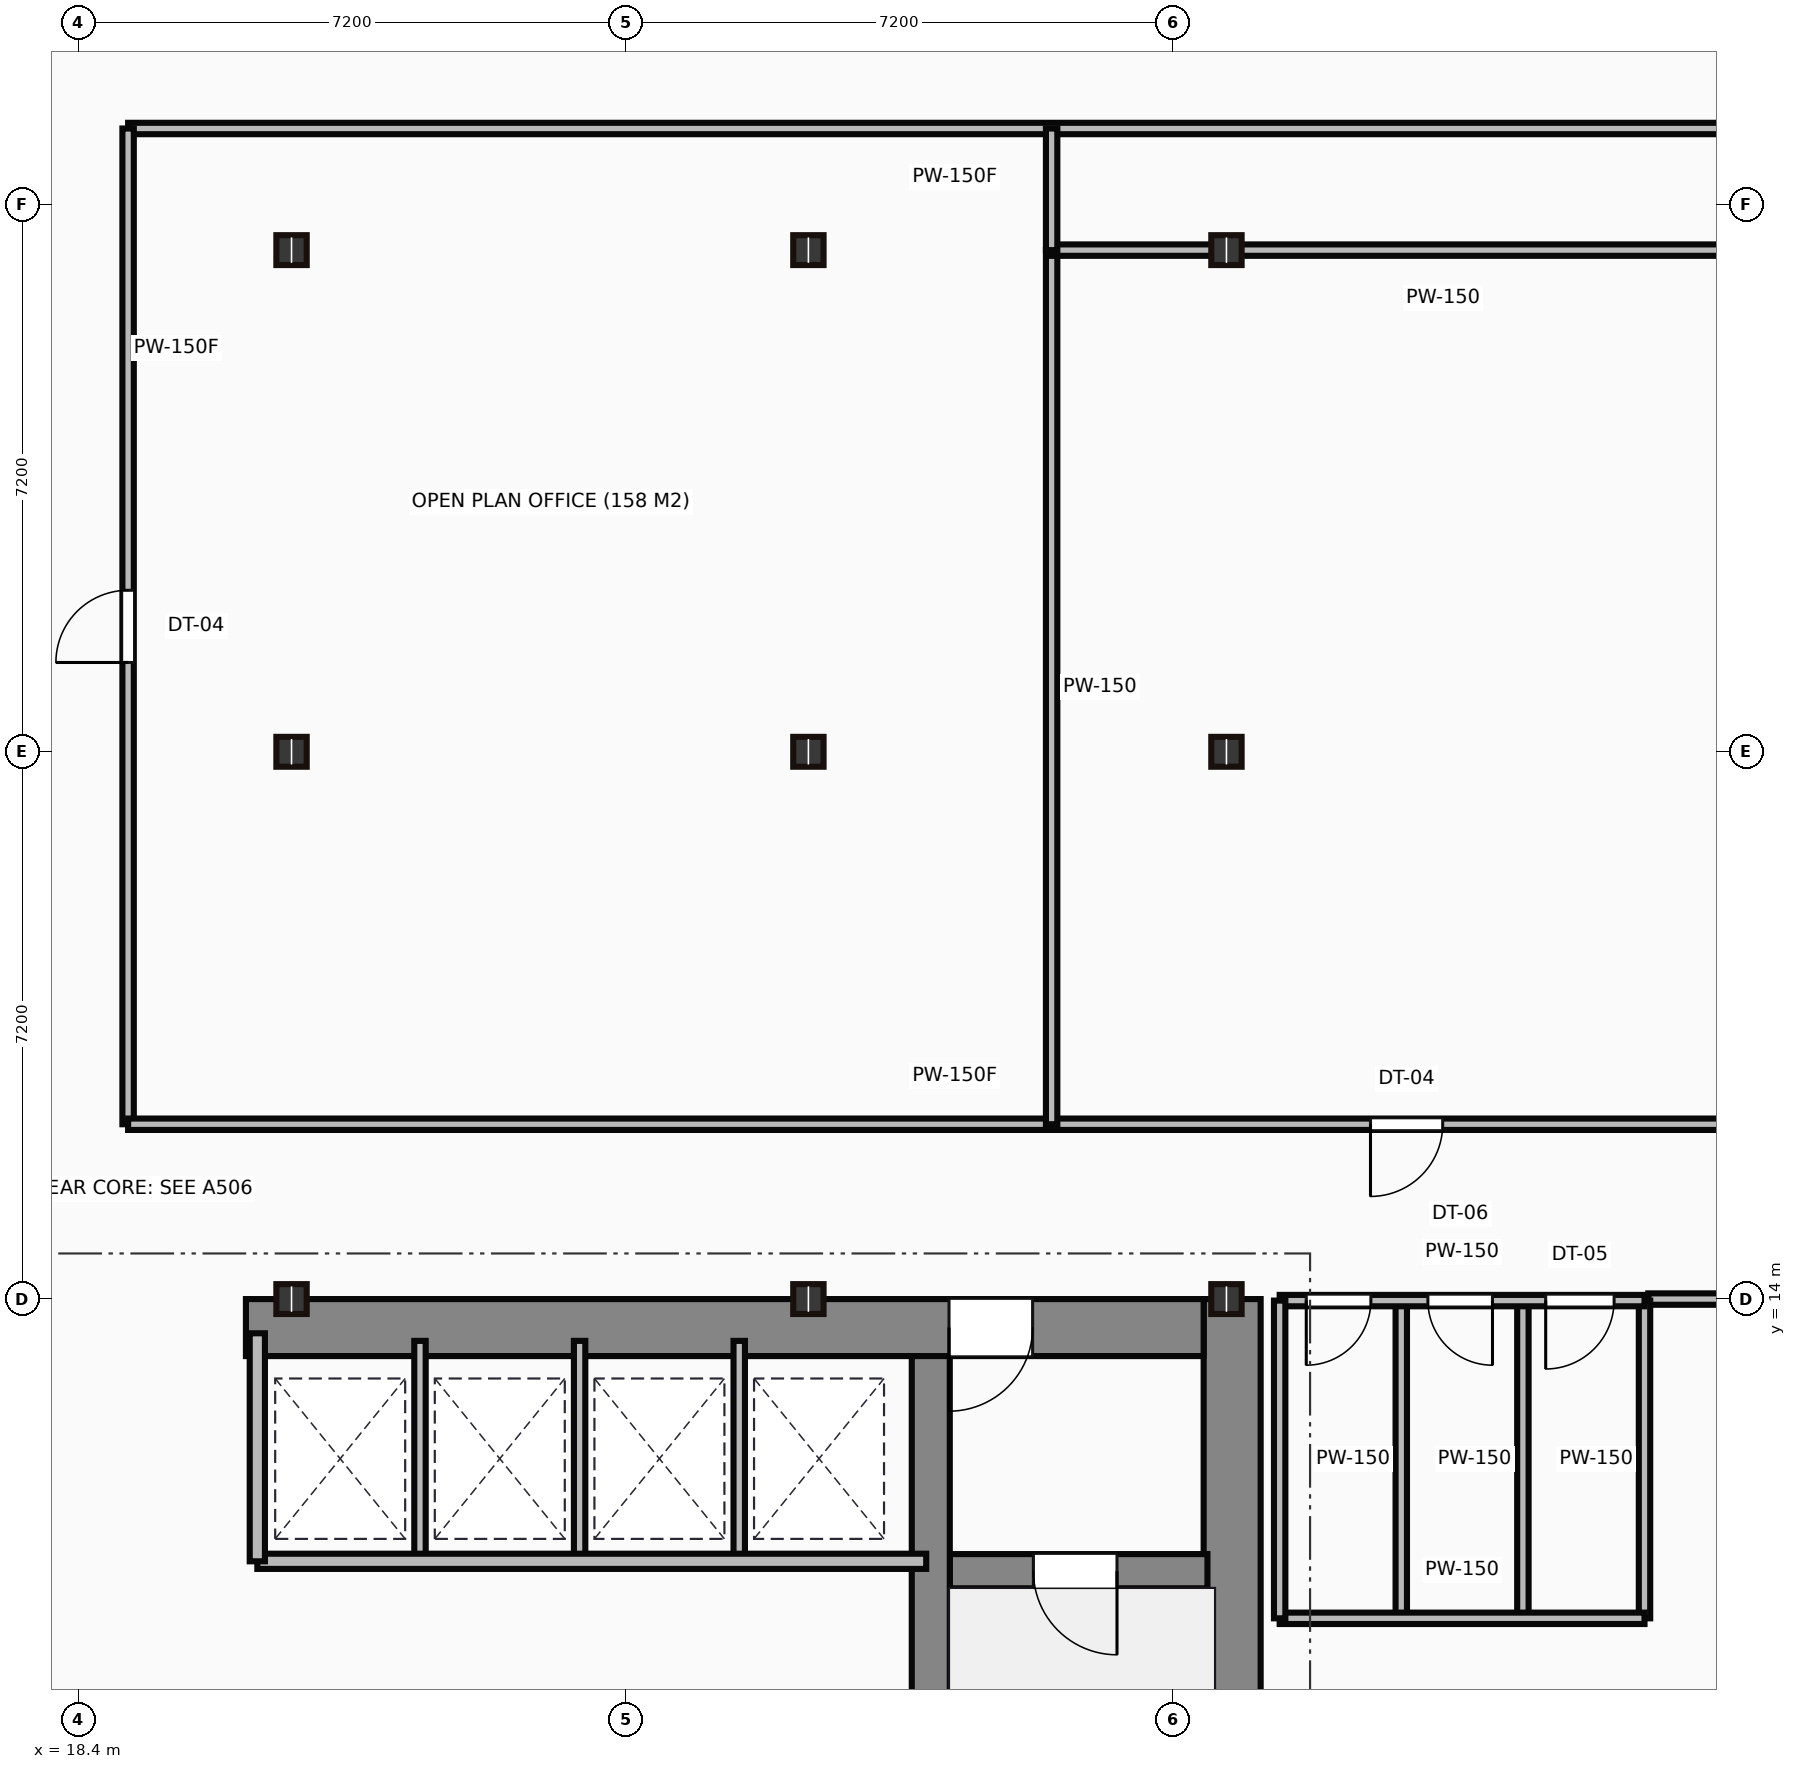
"""IFC4 building model, lengths in metres.
Left out: names, types, materials, properties, quantities, classifications, styles, units other than length and angle.
Written with IfcOpenShell. Run it as: python <this file> out.ifc"""

import sys

from ifc_helpers import new_model, si_unit, direction, frame, frame_2d, origin, origin_2d, place, context, subcontext, project, spatial, rectangle, i_section, extrude, source, transform, mapped, element, fill, save


model = new_model("IFC4")
c1 = context("Model", 3, precision=1e-05, world=origin(), true_north=direction((0.0, 1.0)))
c2 = subcontext(c1, "Body", "Model", "MODEL_VIEW")
j1 = project(units=[si_unit("LENGTHUNIT", "METRE"), si_unit("PLANEANGLEUNIT", "RADIAN")], contexts=[c1])
p1 = place(None, origin())
s1 = spatial("IfcSite", under=j1, at=p1, CompositionType="ELEMENT")
p2 = place(p1, origin())
s2 = spatial("IfcBuilding", under=s1, at=p2, CompositionType="ELEMENT")
p3 = place(p2, frame((0.0, 0.0, 128.8)))
s3 = spatial("IfcBuildingStorey", under=s2, at=p3, CompositionType="ELEMENT", Elevation=128.8)
m1 = source(origin(), c2, "Body", "SweptSolid", [
    extrude(rectangle(XDim=13.1, YDim=0.75, at=frame_2d((6.55, 0.0))), origin(), (0.0, 0.0, 1.0), 3.65),
])
p4 = place(p3, frame((33.575, 0.9, 0.0), z_axis=(0.0, 0.0, 1.0), x_axis=(0.0, 1.0, 0.0)))
e1 = element("IfcWall", 1, at=p4, inside=s3, PredefinedType="SHEAR", context=c2, shape_type="MappedRepresentation", body=[
    mapped(m1, transform((0.0, 0.0, 0.0))),
])
m2 = source(origin(), c2, "Body", "SweptSolid", [
    extrude(rectangle(XDim=12.6, YDim=0.75, at=frame_2d((6.3, 0.0))), origin(), (0.0, 0.0, 1.0), 3.65),
])
p5 = place(p3, frame((20.6, 13.625, 0.0), z_axis=(0.0, 0.0, 1.0), x_axis=(1.0, 0.0, 0.0)))
e2 = element("IfcWall", 2, at=p5, inside=s3, PredefinedType="SHEAR", context=c2, shape_type="MappedRepresentation", body=[
    mapped(m2, transform((0.0, 0.0, 0.0))),
])
p6 = place(p5, frame((9.25, 0.0, 0.0)))
e3 = element("IfcOpeningElement", 3, at=p6, cuts=e2, PredefinedType="OPENING", context=c2, shape_type="SweptSolid", body=[
    extrude(rectangle(XDim=1.1, YDim=2.15, at=frame_2d((0.55, 1.075))), frame((0.0, 0.385, 0.0), z_axis=(0.0, -1.0, 0.0), x_axis=(1.0, 0.0, 0.0)), (0.0, 0.0, 1.0), 0.77),
])
m3 = source(origin(), c2, "Body", "SweptSolid", [
    extrude(rectangle(XDim=12.35, YDim=0.5, at=frame_2d((6.175, 0.0))), origin(), (0.0, 0.0, 1.0), 3.65),
])
p7 = place(p3, frame((29.61, 0.9, 0.0), z_axis=(0.0, 0.0, 1.0), x_axis=(0.0, 1.0, 0.0)))
e4 = element("IfcWall", 4, at=p7, inside=s3, PredefinedType="SHEAR", context=c2, shape_type="MappedRepresentation", body=[
    mapped(m3, transform((0.0, 0.0, 0.0))),
])
m4 = source(origin(), c2, "Body", "SweptSolid", [
    extrude(rectangle(XDim=3.39, YDim=0.45, at=frame_2d((1.695, 0.0))), origin(), (0.0, 0.0, 1.0), 3.65),
])
p8 = place(p3, frame((29.86, 10.42, 0.0), z_axis=(0.0, 0.0, 1.0), x_axis=(1.0, 0.0, 0.0)))
e5 = element("IfcWall", 5, at=p8, inside=s3, PredefinedType="SHEAR", context=c2, shape_type="MappedRepresentation", body=[
    mapped(m4, transform((0.0, 0.0, 0.0))),
])
p9 = place(p8, frame((1.1, 0.0, 0.0)))
e6 = element("IfcOpeningElement", 6, at=p9, cuts=e5, PredefinedType="OPENING", context=c2, shape_type="SweptSolid", body=[
    extrude(rectangle(XDim=1.1, YDim=2.15, at=frame_2d((0.55, 1.075))), frame((0.0, 0.235, 0.0), z_axis=(0.0, -1.0, 0.0), x_axis=(1.0, 0.0, 0.0)), (0.0, 0.0, 1.0), 0.47),
])
m5 = source(origin(), c2, "Body", "SweptSolid", [
    extrude(i_section(OverallWidth=0.399, OverallDepth=0.393, WebThickness=0.023, FlangeThickness=0.037, at=origin_2d()), origin(), (0.0, 0.0, 1.0), 3.65),
])
for number, where, z_axis, x_axis in (
    (7, (21.2, 14.0, 0.0), (0.0, 0.0, 1.0), (1.0, 0.0, 0.0)),
    (8, (21.2, 21.2, 0.0), (0.0, 0.0, 1.0), (1.0, 0.0, 0.0)),
    (9, (21.2, 27.8, 0.0), (0.0, 0.0, 1.0), (1.0, 0.0, 0.0)),
    (10, (28.0, 14.0, 0.0), (0.0, 0.0, 1.0), (1.0, 0.0, 0.0)),
    (11, (28.0, 21.2, 0.0), (0.0, 0.0, 1.0), (1.0, 0.0, 0.0)),
    (12, (28.0, 27.8, 0.0), (0.0, 0.0, 1.0), (1.0, 0.0, 0.0)),
    (13, (33.5, 14.0, 0.0), (0.0, 0.0, 1.0), (1.0, 0.0, 0.0)),
    (14, (33.5, 21.2, 0.0), (0.0, 0.0, 1.0), (1.0, 0.0, 0.0)),
    (15, (33.5, 27.8, 0.0), (0.0, 0.0, 1.0), (1.0, 0.0, 0.0)),
):
    element("IfcColumn", number, at=place(p3, frame(where, z_axis=z_axis, x_axis=x_axis)), inside=s3, PredefinedType="COLUMN", context=c2, shape_type="MappedRepresentation", body=[
        mapped(m5, transform((0.0, 0.0, 0.0))),
    ])
m6 = source(origin(), c2, "Body", "SweptSolid", [
    extrude(rectangle(XDim=8.8, YDim=0.2, at=frame_2d((4.4, 0.0))), origin(), (0.0, 0.0, 1.0), 3.4),
])
p10 = place(p3, frame((20.75, 10.55, 0.0), z_axis=(0.0, 0.0, 1.0), x_axis=(1.0, 0.0, 0.0)))
e16 = element("IfcWall", 16, at=p10, inside=s3, PredefinedType="PARTITIONING", context=c2, shape_type="MappedRepresentation", body=[
    mapped(m6, transform((0.0, 0.0, 0.0))),
])
m7 = source(origin(), c2, "Body", "SweptSolid", [
    extrude(rectangle(XDim=3.0, YDim=0.2, at=frame_2d((1.5, 0.0))), origin(), (0.0, 0.0, 1.0), 3.4),
])
p11 = place(p3, frame((20.75, 10.55, 0.0), z_axis=(0.0, 0.0, 1.0), x_axis=(0.0, 1.0, 0.0)))
e17 = element("IfcWall", 17, at=p11, inside=s3, PredefinedType="PARTITIONING", context=c2, shape_type="MappedRepresentation", body=[
    mapped(m7, transform((0.0, 0.0, 0.0))),
])
m8 = source(origin(), c2, "Body", "SweptSolid", [
    extrude(rectangle(XDim=2.85, YDim=0.15, at=frame_2d((1.425, 0.0))), origin(), (0.0, 0.0, 1.0), 3.4),
])
for number, where, z_axis, x_axis in (
    (18, (22.89, 10.6, 0.0), (0.0, 0.0, 1.0), (0.0, 1.0, 0.0)),
    (19, (24.99, 10.6, 0.0), (0.0, 0.0, 1.0), (0.0, 1.0, 0.0)),
    (20, (27.09, 10.6, 0.0), (0.0, 0.0, 1.0), (0.0, 1.0, 0.0)),
):
    element("IfcWall", number, at=place(p3, frame(where, z_axis=z_axis, x_axis=x_axis)), inside=s3, PredefinedType="PARTITIONING", context=c2, shape_type="MappedRepresentation", body=[
        mapped(m8, transform((0.0, 0.0, 0.0))),
    ])
m9 = source(origin(), c2, "Body", "SweptSolid", [
    extrude(rectangle(XDim=4.8, YDim=0.15, at=frame_2d((2.4, 0.0))), origin(), (0.0, 0.0, 1.0), 2.702),
])
p12 = place(p3, frame((34.2, 13.98, 0.0), z_axis=(0.0, 0.0, 1.0), x_axis=(1.0, 0.0, 0.0)))
e21 = element("IfcWall", 21, at=p12, inside=s3, PredefinedType="PARTITIONING", context=c2, shape_type="MappedRepresentation", body=[
    mapped(m9, transform((0.0, 0.0, 0.0))),
])
p13 = place(p12, frame((0.35, 0.0, 0.0)))
e22 = element("IfcOpeningElement", 22, at=p13, cuts=e21, PredefinedType="OPENING", context=c2, shape_type="SweptSolid", body=[
    extrude(rectangle(XDim=0.85, YDim=2.1, at=frame_2d((0.425, 1.05))), frame((0.0, 0.085, 0.0), z_axis=(0.0, -1.0, 0.0), x_axis=(1.0, 0.0, 0.0)), (0.0, 0.0, 1.0), 0.17),
])
p14 = place(p12, frame((1.95, 0.0, 0.0)))
e23 = element("IfcOpeningElement", 23, at=p14, cuts=e21, PredefinedType="OPENING", context=c2, shape_type="SweptSolid", body=[
    extrude(rectangle(XDim=0.85, YDim=2.1, at=frame_2d((0.425, 1.05))), frame((0.0, 0.085, 0.0), z_axis=(0.0, -1.0, 0.0), x_axis=(1.0, 0.0, 0.0)), (0.0, 0.0, 1.0), 0.17),
])
p15 = place(p12, frame((3.5, 0.0, 0.0)))
e24 = element("IfcOpeningElement", 24, at=p15, cuts=e21, PredefinedType="OPENING", context=c2, shape_type="SweptSolid", body=[
    extrude(rectangle(XDim=0.9, YDim=2.1, at=frame_2d((0.45, 1.05))), frame((0.0, 0.085, 0.0), z_axis=(0.0, -1.0, 0.0), x_axis=(1.0, 0.0, 0.0)), (0.0, 0.0, 1.0), 0.17),
])
m10 = source(origin(), c2, "Body", "SweptSolid", [
    extrude(rectangle(XDim=4.8, YDim=0.15, at=frame_2d((2.4, 0.0))), origin(), (0.0, 0.0, 1.0), 3.4),
])
p16 = place(p3, frame((34.2, 9.8, 0.0), z_axis=(0.0, 0.0, 1.0), x_axis=(1.0, 0.0, 0.0)))
e25 = element("IfcWall", 25, at=p16, inside=s3, PredefinedType="PARTITIONING", context=c2, shape_type="MappedRepresentation", body=[
    mapped(m10, transform((0.0, 0.0, 0.0))),
])
m11 = source(origin(), c2, "Body", "SweptSolid", [
    extrude(rectangle(XDim=4.18, YDim=0.15, at=frame_2d((2.09, 0.0))), origin(), (0.0, 0.0, 1.0), 3.4),
])
for number, where, z_axis, x_axis in (
    (26, (39.0, 9.8, 0.0), (0.0, 0.0, 1.0), (0.0, 1.0, 0.0)),
    (27, (34.2, 9.8, 0.0), (0.0, 0.0, 1.0), (0.0, 1.0, 0.0)),
    (28, (35.8, 9.8, 0.0), (0.0, 0.0, 1.0), (0.0, 1.0, 0.0)),
    (29, (37.4, 9.8, 0.0), (0.0, 0.0, 1.0), (0.0, 1.0, 0.0)),
):
    element("IfcWall", number, at=place(p3, frame(where, z_axis=z_axis, x_axis=x_axis)), inside=s3, PredefinedType="PARTITIONING", context=c2, shape_type="MappedRepresentation", body=[
        mapped(m11, transform((0.0, 0.0, 0.0))),
    ])
m12 = source(origin(), c2, "Body", "SweptSolid", [
    extrude(rectangle(XDim=21.75, YDim=0.15, at=frame_2d((10.875, 0.0))), origin(), (0.0, 0.0, 1.0), 3.4),
])
p17 = place(p3, frame((40.8, 29.4, 0.0), z_axis=(0.0, 0.0, 1.0), x_axis=(-1.0, 0.0, 0.0)))
e30 = element("IfcWall", 30, at=p17, inside=s3, PredefinedType="PARTITIONING", context=c2, shape_type="MappedRepresentation", body=[
    mapped(m12, transform((0.0, 0.0, 0.0))),
])
m13 = source(origin(), c2, "Body", "SweptSolid", [
    extrude(rectangle(XDim=13.1, YDim=0.15, at=frame_2d((6.55, 0.0))), origin(), (0.0, 0.0, 1.0), 3.4),
])
p18 = place(p3, frame((19.05, 29.4, 0.0), z_axis=(0.0, 0.0, 1.0), x_axis=(0.0, -1.0, 0.0)))
e31 = element("IfcWall", 31, at=p18, inside=s3, PredefinedType="PARTITIONING", context=c2, shape_type="MappedRepresentation", body=[
    mapped(m13, transform((0.0, 0.0, 0.0))),
])
p19 = place(p18, frame((6.075, 0.0, 0.0)))
e32 = element("IfcOpeningElement", 32, at=p19, cuts=e31, PredefinedType="OPENING", context=c2, shape_type="SweptSolid", body=[
    extrude(rectangle(XDim=0.95, YDim=2.15, at=frame_2d((0.475, 1.075))), frame((0.0, 0.085, 0.0), z_axis=(0.0, -1.0, 0.0), x_axis=(1.0, 0.0, 0.0)), (0.0, 0.0, 1.0), 0.17),
])
p20 = place(p3, frame((19.05, 16.3, 0.0), z_axis=(0.0, 0.0, 1.0), x_axis=(1.0, 0.0, 0.0)))
e33 = element("IfcWall", 33, at=p20, inside=s3, PredefinedType="PARTITIONING", context=c2, shape_type="MappedRepresentation", body=[
    mapped(m12, transform((0.0, 0.0, 0.0))),
])
p21 = place(p20, frame((16.345, 0.0, 0.0)))
e34 = element("IfcOpeningElement", 34, at=p21, cuts=e33, PredefinedType="OPENING", context=c2, shape_type="SweptSolid", body=[
    extrude(rectangle(XDim=0.95, YDim=2.15, at=frame_2d((0.475, 1.075))), frame((0.0, 0.085, 0.0), z_axis=(0.0, -1.0, 0.0), x_axis=(1.0, 0.0, 0.0)), (0.0, 0.0, 1.0), 0.17),
])
m14 = source(origin(), c2, "Body", "SweptSolid", [
    extrude(rectangle(XDim=1.75, YDim=0.15, at=frame_2d((0.875, 0.0))), origin(), (0.0, 0.0, 1.0), 2.702),
])
p22 = place(p3, frame((40.8, 14.0, 0.0), z_axis=(0.0, 0.0, 1.0), x_axis=(-1.0, 0.0, 0.0)))
e35 = element("IfcWall", 35, at=p22, inside=s3, PredefinedType="PARTITIONING", context=c2, shape_type="MappedRepresentation", body=[
    mapped(m14, transform((0.0, 0.0, 0.0))),
])
m15 = source(origin(), c2, "Body", "SweptSolid", [
    extrude(rectangle(XDim=11.5, YDim=0.15, at=frame_2d((5.75, 0.0))), origin(), (0.0, 0.0, 1.0), 3.4),
])
p23 = place(p3, frame((31.2, 27.8, 0.0), z_axis=(0.0, 0.0, 1.0), x_axis=(0.0, -1.0, 0.0)))
e36 = element("IfcWall", 36, at=p23, inside=s3, PredefinedType="PARTITIONING", context=c2, shape_type="MappedRepresentation", body=[
    mapped(m15, transform((0.0, 0.0, 0.0))),
])
m16 = source(origin(), c2, "Body", "SweptSolid", [
    extrude(rectangle(XDim=10.3, YDim=0.15, at=frame_2d((5.15, 0.0))), origin(), (0.0, 0.0, 1.0), 2.702),
])
p24 = place(p3, frame((41.5, 27.8, 0.0), z_axis=(0.0, 0.0, 1.0), x_axis=(-1.0, 0.0, 0.0)))
e37 = element("IfcWall", 37, at=p24, inside=s3, PredefinedType="PARTITIONING", context=c2, shape_type="MappedRepresentation", body=[
    mapped(m16, transform((0.0, 0.0, 0.0))),
])
m17 = source(origin(), c2, "Body", "SweptSolid", [
    extrude(rectangle(XDim=1.6, YDim=0.15, at=frame_2d((0.8, 0.0))), origin(), (0.0, 0.0, 1.0), 3.4),
])
p25 = place(p3, frame((31.2, 29.4, 0.0), z_axis=(0.0, 0.0, 1.0), x_axis=(0.0, -1.0, 0.0)))
e38 = element("IfcWall", 38, at=p25, inside=s3, PredefinedType="PARTITIONING", context=c2, shape_type="MappedRepresentation", body=[
    mapped(m17, transform((0.0, 0.0, 0.0))),
])
m18 = source(origin(), c2, "Body", "SweptSolid", [
    extrude(rectangle(XDim=1.1, YDim=2.15, at=frame_2d((0.55, 1.075))), frame((0.0, 0.025, 0.0), z_axis=(0.0, -1.0, 0.0), x_axis=(1.0, 0.0, 0.0)), (0.0, 0.0, 1.0), 0.05),
])
p26 = place(p9, frame((1.1, 0.0, 0.0), z_axis=(0.0, 0.0, 1.0), x_axis=(-1.0, 0.0, 0.0)))
e39 = element("IfcDoor", 39, at=p26, inside=s3, OperationType="SINGLE_SWING_RIGHT", PredefinedType="DOOR", context=c2, shape_type="MappedRepresentation", body=[
    mapped(m18, transform((0.0, 0.0, 0.0))),
])
fill(e6, e39)
p27 = place(p6, origin())
e40 = element("IfcDoor", 40, at=p27, inside=s3, OperationType="SINGLE_SWING_LEFT", PredefinedType="DOOR", context=c2, shape_type="MappedRepresentation", body=[
    mapped(m18, transform((0.0, 0.0, 0.0))),
])
fill(e3, e40)
m19 = source(origin(), c2, "Body", "SweptSolid", [
    extrude(rectangle(XDim=0.85, YDim=2.1, at=frame_2d((0.425, 1.05))), frame((0.0, 0.025, 0.0), z_axis=(0.0, -1.0, 0.0), x_axis=(1.0, 0.0, 0.0)), (0.0, 0.0, 1.0), 0.05),
])
p28 = place(p13, frame((0.85, 0.0, 0.0), z_axis=(0.0, 0.0, 1.0), x_axis=(-1.0, 0.0, 0.0)))
e41 = element("IfcDoor", 41, at=p28, inside=s3, OperationType="SINGLE_SWING_LEFT", PredefinedType="DOOR", context=c2, shape_type="MappedRepresentation", body=[
    mapped(m19, transform((0.0, 0.0, 0.0))),
])
fill(e22, e41)
p29 = place(p14, frame((0.85, 0.0, 0.0), z_axis=(0.0, 0.0, 1.0), x_axis=(-1.0, 0.0, 0.0)))
e42 = element("IfcDoor", 42, at=p29, inside=s3, OperationType="SINGLE_SWING_RIGHT", PredefinedType="DOOR", context=c2, shape_type="MappedRepresentation", body=[
    mapped(m19, transform((0.0, 0.0, 0.0))),
])
fill(e23, e42)
m20 = source(origin(), c2, "Body", "SweptSolid", [
    extrude(rectangle(XDim=0.9, YDim=2.1, at=frame_2d((0.45, 1.05))), frame((0.0, 0.025, 0.0), z_axis=(0.0, -1.0, 0.0), x_axis=(1.0, 0.0, 0.0)), (0.0, 0.0, 1.0), 0.05),
])
p30 = place(p15, frame((0.9, 0.0, 0.0), z_axis=(0.0, 0.0, 1.0), x_axis=(-1.0, 0.0, 0.0)))
e43 = element("IfcDoor", 43, at=p30, inside=s3, OperationType="SINGLE_SWING_LEFT", PredefinedType="DOOR", context=c2, shape_type="MappedRepresentation", body=[
    mapped(m20, transform((0.0, 0.0, 0.0))),
])
fill(e24, e43)
m21 = source(origin(), c2, "Body", "SweptSolid", [
    extrude(rectangle(XDim=0.95, YDim=2.15, at=frame_2d((0.475, 1.075))), frame((0.0, 0.025, 0.0), z_axis=(0.0, -1.0, 0.0), x_axis=(1.0, 0.0, 0.0)), (0.0, 0.0, 1.0), 0.05),
])
p31 = place(p19, origin())
e44 = element("IfcDoor", 44, at=p31, inside=s3, OperationType="SINGLE_SWING_RIGHT", PredefinedType="DOOR", context=c2, shape_type="MappedRepresentation", body=[
    mapped(m21, transform((0.0, 0.0, 0.0))),
])
fill(e32, e44)
p32 = place(p21, origin())
e45 = element("IfcDoor", 45, at=p32, inside=s3, OperationType="SINGLE_SWING_LEFT", PredefinedType="DOOR", context=c2, shape_type="MappedRepresentation", body=[
    mapped(m21, transform((0.0, 0.0, 0.0))),
])
fill(e34, e45)
save(model, sys.argv[1])
